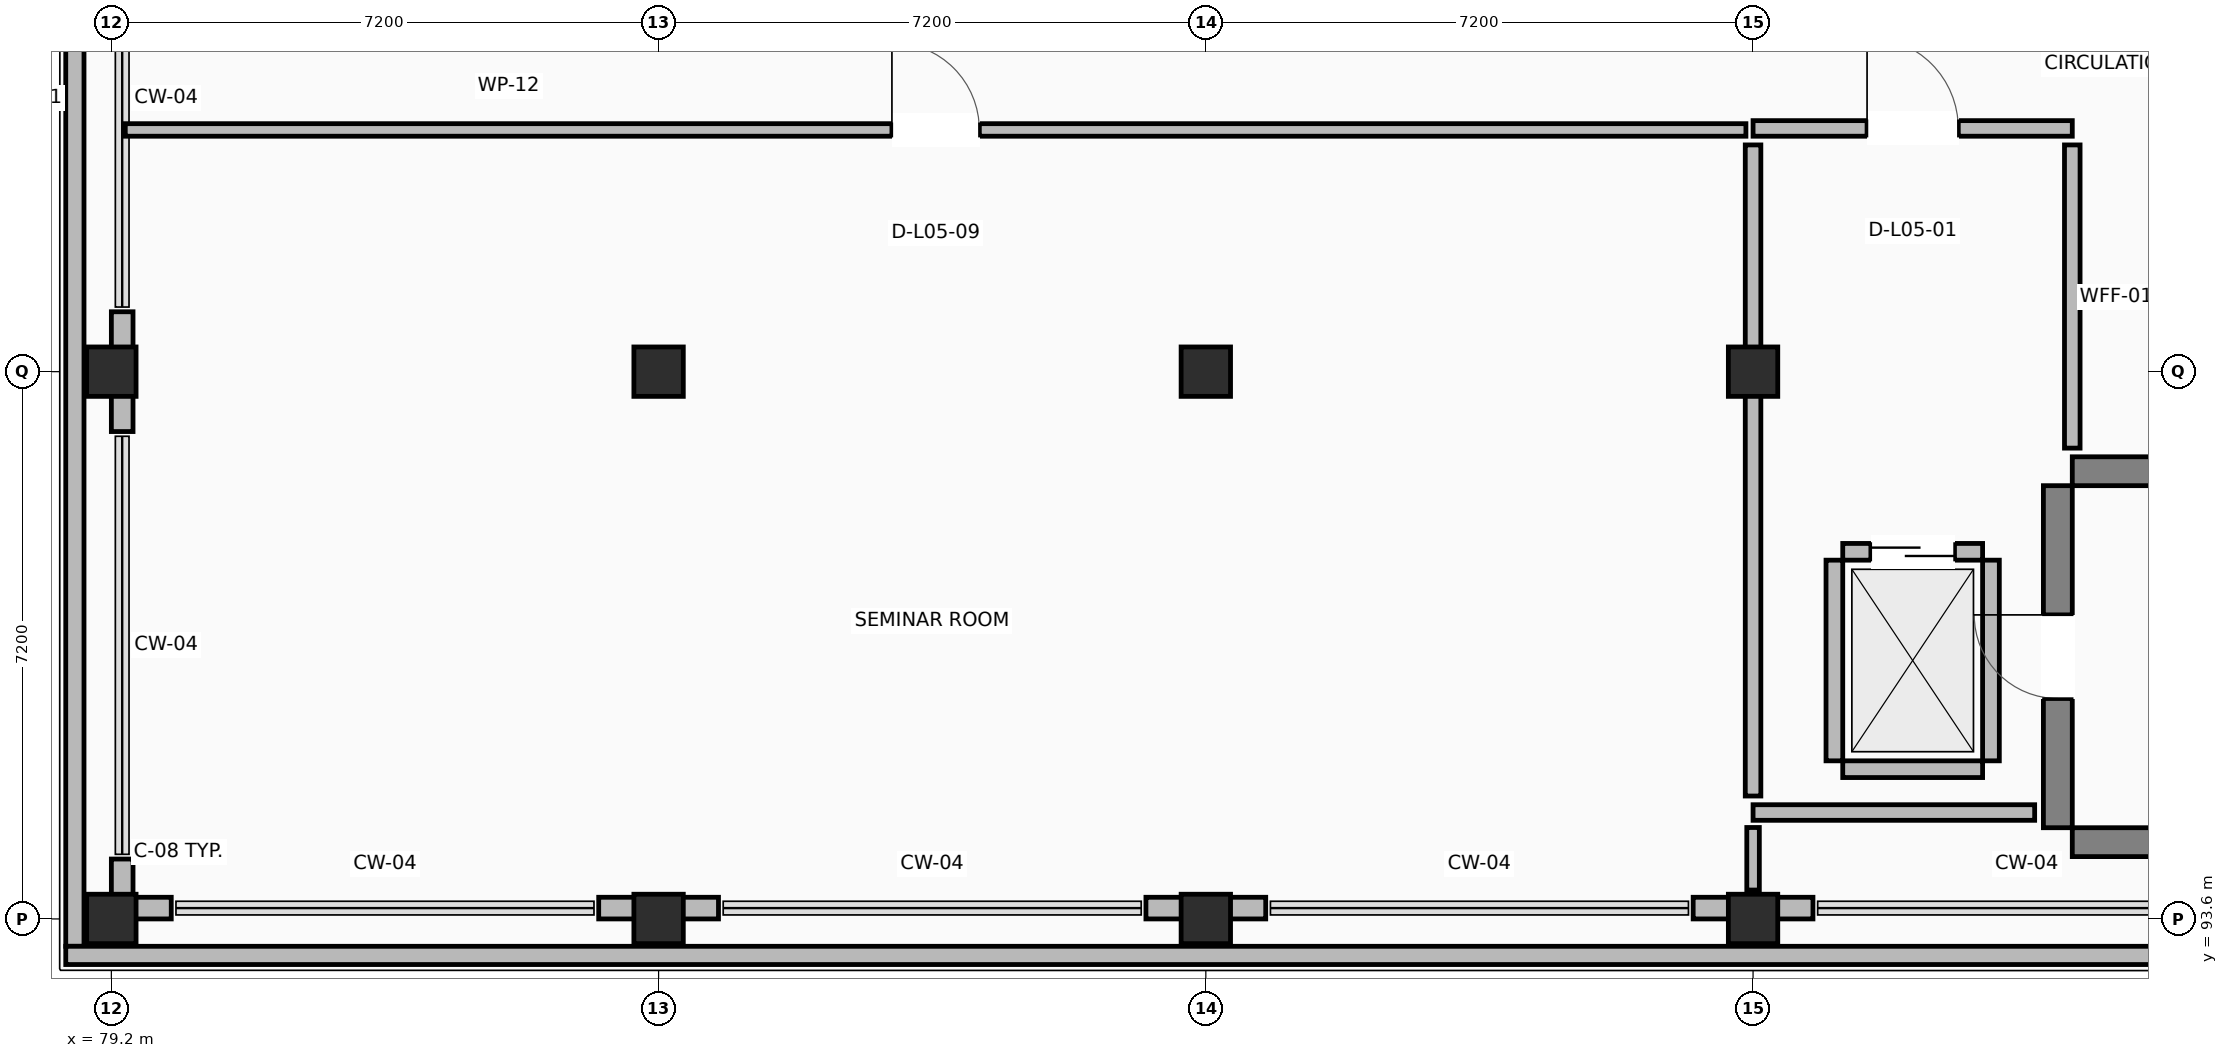
"""IFC4 building model, lengths in metres.
Left out: names, types, materials, properties, quantities, classifications, styles, units other than length and angle.
Written with IfcOpenShell. Run it as: python <this file> out.ifc"""

import sys

from ifc_helpers import new_model, si_unit, direction, frame, frame_2d, origin, origin_2d, place, context, subcontext, project, spatial, rectangle, extrude, element, fill, save


model = new_model("IFC4")
c1 = context("Model", 3, precision=1e-05, world=origin(), true_north=direction((0.0, 1.0)))
c2 = subcontext(c1, "Body", "Model", "MODEL_VIEW")
j1 = project(units=[si_unit("LENGTHUNIT", "METRE"), si_unit("PLANEANGLEUNIT", "RADIAN")], contexts=[c1])
p1 = place(None, origin())
s1 = spatial("IfcSite", under=j1, at=p1, CompositionType="ELEMENT")
p2 = place(p1, origin())
s2 = spatial("IfcBuilding", under=s1, at=p2, CompositionType="ELEMENT")
p3 = place(p2, frame((0.0, 0.0, 22.5)))
s3 = spatial("IfcBuildingStorey", under=s2, at=p3, CompositionType="ELEMENT", Elevation=22.5)
for number, where, z_axis, x_axis in (
    (1, (79.2, 93.6, 0.0), (0.0, 0.0, 1.0), (1.0, 0.0, 0.0)),
    (2, (79.2, 100.8, 0.0), (0.0, 0.0, 1.0), (1.0, 0.0, 0.0)),
    (3, (86.4, 93.6, 0.0), (0.0, 0.0, 1.0), (1.0, 0.0, 0.0)),
    (4, (86.4, 100.8, 0.0), (0.0, 0.0, 1.0), (1.0, 0.0, 0.0)),
    (5, (93.6, 93.6, 0.0), (0.0, 0.0, 1.0), (1.0, 0.0, 0.0)),
    (6, (93.6, 100.8, 0.0), (0.0, 0.0, 1.0), (1.0, 0.0, 0.0)),
    (7, (100.8, 93.6, 0.0), (0.0, 0.0, 1.0), (1.0, 0.0, 0.0)),
    (8, (100.8, 100.8, 0.0), (0.0, 0.0, 1.0), (1.0, 0.0, 0.0)),
):
    element("IfcColumn", number, at=place(p3, frame(where, z_axis=z_axis, x_axis=x_axis)), inside=s3, PredefinedType="COLUMN", context=c2, shape_type="SweptSolid", body=[
        extrude(rectangle(XDim=0.65, YDim=0.65, at=origin_2d()), origin(), (0.0, 0.0, 1.0), 4.22),
    ])
for number, where, z_axis, x_axis in (
    (9, (105.0, 94.61, 0.0), (0.0, 0.0, 1.0), (1.0, 0.0, 0.0)),
    (10, (105.0, 99.49, 0.0), (0.0, 0.0, 1.0), (1.0, 0.0, 0.0)),
):
    element("IfcWall", number, at=place(p3, frame(where, z_axis=z_axis, x_axis=x_axis)), inside=s3, PredefinedType="SHEAR", context=c2, shape_type="SweptSolid", body=[
        extrude(rectangle(XDim=9.5, YDim=0.38, at=frame_2d((4.75, 0.0))), origin(), (0.0, 0.0, 1.0), 4.22),
    ])
p4 = place(p3, frame((104.81, 94.8, 0.0), z_axis=(0.0, 0.0, 1.0), x_axis=(0.0, 1.0, 0.0)))
e11 = element("IfcWall", 11, at=p4, inside=s3, PredefinedType="SHEAR", context=c2, shape_type="SweptSolid", body=[
    extrude(rectangle(XDim=4.5, YDim=0.38, at=frame_2d((2.25, 0.0))), origin(), (0.0, 0.0, 1.0), 4.22),
])
p5 = place(p4, frame((1.7, 0.0, 0.0)))
e12 = element("IfcOpeningElement", 12, at=p5, cuts=e11, PredefinedType="OPENING", context=c2, shape_type="SweptSolid", body=[
    extrude(rectangle(XDim=1.1, YDim=2.15, at=frame_2d((0.55, 1.075))), frame((0.0, 0.2, 0.0), z_axis=(0.0, -1.0, 0.0), x_axis=(1.0, 0.0, 0.0)), (0.0, 0.0, 1.0), 0.4),
])
p6 = place(p3, frame((79.343, 101.588, 0.0), z_axis=(0.0, 0.0, 1.0), x_axis=(0.0, -1.0, 0.0)))
e13 = element("IfcWall", 13, at=p6, inside=s3, PredefinedType="STANDARD", context=c2, shape_type="SweptSolid", body=[
    extrude(rectangle(XDim=1.576, YDim=0.285, at=frame_2d((0.788, 0.0))), origin(), (0.0, 0.0, 1.0), 3.26),
])
p7 = place(p3, frame((79.343, 94.388, 0.0), z_axis=(0.0, 0.0, 1.0), x_axis=(0.0, -1.0, 0.0)))
e14 = element("IfcWall", 14, at=p7, inside=s3, PredefinedType="STANDARD", context=c2, shape_type="SweptSolid", body=[
    extrude(rectangle(XDim=0.503, YDim=0.285, at=frame_2d((0.251, 0.0))), origin(), (0.0, 0.0, 1.0), 3.26),
])
p8 = place(p3, frame((79.2, 93.742, 0.0), z_axis=(0.0, 0.0, 1.0), x_axis=(1.0, 0.0, 0.0)))
e15 = element("IfcWall", 15, at=p8, inside=s3, PredefinedType="STANDARD", context=c2, shape_type="SweptSolid", body=[
    extrude(rectangle(XDim=0.788, YDim=0.285, at=frame_2d((0.394, 0.0))), origin(), (0.0, 0.0, 1.0), 3.26),
])
for number, where, z_axis, x_axis in (
    (16, (85.612, 93.742, 0.0), (0.0, 0.0, 1.0), (1.0, 0.0, 0.0)),
    (17, (92.812, 93.742, 0.0), (0.0, 0.0, 1.0), (1.0, 0.0, 0.0)),
    (18, (100.012, 93.742, 0.0), (0.0, 0.0, 1.0), (1.0, 0.0, 0.0)),
):
    element("IfcWall", number, at=place(p3, frame(where, z_axis=z_axis, x_axis=x_axis)), inside=s3, PredefinedType="STANDARD", context=c2, shape_type="SweptSolid", body=[
        extrude(rectangle(XDim=1.576, YDim=0.285, at=frame_2d((0.788, 0.0))), origin(), (0.0, 0.0, 1.0), 3.26),
    ])
p9 = place(p3, frame((78.72, 93.24, 0.0), z_axis=(0.0, 0.0, 1.0), x_axis=(0.0, 1.0, 0.0)))
e19 = element("IfcWall", 19, at=p9, inside=s3, PredefinedType="PARAPET", context=c2, shape_type="SweptSolid", body=[
    extrude(rectangle(XDim=22.32, YDim=0.24, at=frame_2d((11.16, 0.0))), origin(), (0.0, 0.0, 1.0), 1.12),
])
p10 = place(p3, frame((136.44, 93.12, 0.0), z_axis=(0.0, 0.0, 1.0), x_axis=(-1.0, 0.0, 0.0)))
e20 = element("IfcWall", 20, at=p10, inside=s3, PredefinedType="PARAPET", context=c2, shape_type="SweptSolid", body=[
    extrude(rectangle(XDim=57.84, YDim=0.24, at=frame_2d((28.92, 0.0))), origin(), (0.0, 0.0, 1.0), 1.12),
])
p11 = place(p3, frame((101.98, 95.57, 0.0), z_axis=(0.0, 0.0, 1.0), x_axis=(1.0, 0.0, 0.0)))
e21 = element("IfcWall", 21, at=p11, inside=s3, PredefinedType="STANDARD", context=c2, shape_type="SweptSolid", body=[
    extrude(rectangle(XDim=1.84, YDim=0.22, at=frame_2d((0.92, 0.0))), origin(), (0.0, 0.0, 1.0), 3.26),
])
p12 = place(p3, frame((101.98, 98.43, 0.0), z_axis=(0.0, 0.0, 1.0), x_axis=(1.0, 0.0, 0.0)))
e22 = element("IfcWall", 22, at=p12, inside=s3, PredefinedType="STANDARD", context=c2, shape_type="SweptSolid", body=[
    extrude(rectangle(XDim=1.84, YDim=0.22, at=frame_2d((0.92, 0.0))), origin(), (0.0, 0.0, 1.0), 3.26),
])
p13 = place(p12, frame((0.37, 0.0, 0.0)))
e23 = element("IfcOpeningElement", 23, at=p13, cuts=e22, PredefinedType="OPENING", context=c2, shape_type="SweptSolid", body=[
    extrude(rectangle(XDim=1.1, YDim=2.15, at=frame_2d((0.55, 1.075))), frame((0.0, 0.12, 0.0), z_axis=(0.0, -1.0, 0.0), x_axis=(1.0, 0.0, 0.0)), (0.0, 0.0, 1.0), 0.24),
])
for number, where, z_axis, x_axis in (
    (24, (101.87, 95.68, 0.0), (0.0, 0.0, 1.0), (0.0, 1.0, 0.0)),
    (25, (103.93, 95.68, 0.0), (0.0, 0.0, 1.0), (0.0, 1.0, 0.0)),
):
    element("IfcWall", number, at=place(p3, frame(where, z_axis=z_axis, x_axis=x_axis)), inside=s3, PredefinedType="STANDARD", context=c2, shape_type="SweptSolid", body=[
        extrude(rectangle(XDim=2.64, YDim=0.22, at=frame_2d((1.32, 0.0))), origin(), (0.0, 0.0, 1.0), 3.26),
    ])
p14 = place(p3, frame((100.8, 104.0, 0.0), z_axis=(0.0, 0.0, 1.0), x_axis=(1.0, 0.0, 0.0)))
e26 = element("IfcWall", 26, at=p14, inside=s3, PredefinedType="PARTITIONING", context=c2, shape_type="SweptSolid", body=[
    extrude(rectangle(XDim=4.2, YDim=0.205, at=frame_2d((2.1, 0.0))), origin(), (0.0, 0.0, 1.0), 3.26),
])
p15 = place(p14, frame((1.5, 0.0, 0.0)))
e27 = element("IfcOpeningElement", 27, at=p15, cuts=e26, PredefinedType="OPENING", context=c2, shape_type="SweptSolid", body=[
    extrude(rectangle(XDim=1.2, YDim=2.15, at=frame_2d((0.6, 1.075))), frame((0.0, 0.113, 0.0), z_axis=(0.0, -1.0, 0.0), x_axis=(1.0, 0.0, 0.0)), (0.0, 0.0, 1.0), 0.225),
])
p16 = place(p3, frame((105.0, 103.783, 0.0), z_axis=(0.0, 0.0, 1.0), x_axis=(0.0, -1.0, 0.0)))
e28 = element("IfcWall", 28, at=p16, inside=s3, PredefinedType="PARTITIONING", context=c2, shape_type="SweptSolid", body=[
    extrude(rectangle(XDim=3.989, YDim=0.205, at=frame_2d((1.995, 0.0))), origin(), (0.0, 0.0, 1.0), 3.26),
])
p17 = place(p3, frame((104.505, 95.0, 0.0), z_axis=(0.0, 0.0, 1.0), x_axis=(-1.0, 0.0, 0.0)))
e29 = element("IfcWall", 29, at=p17, inside=s3, PredefinedType="PARTITIONING", context=c2, shape_type="SweptSolid", body=[
    extrude(rectangle(XDim=3.705, YDim=0.205, at=frame_2d((1.853, 0.0))), origin(), (0.0, 0.0, 1.0), 3.26),
])
p18 = place(p3, frame((100.8, 95.217, 0.0), z_axis=(0.0, 0.0, 1.0), x_axis=(0.0, 1.0, 0.0)))
e30 = element("IfcWall", 30, at=p18, inside=s3, PredefinedType="PARTITIONING", context=c2, shape_type="SweptSolid", body=[
    extrude(rectangle(XDim=8.566, YDim=0.205, at=frame_2d((4.283, 0.0))), origin(), (0.0, 0.0, 1.0), 3.26),
])
p19 = place(p3, frame((79.383, 103.98, 0.0), z_axis=(0.0, 0.0, 1.0), x_axis=(1.0, 0.0, 0.0)))
e31 = element("IfcWall", 31, at=p19, inside=s3, PredefinedType="PARTITIONING", context=c2, shape_type="SweptSolid", body=[
    extrude(rectangle(XDim=21.323, YDim=0.165, at=frame_2d((10.662, 0.0))), origin(), (0.0, 0.0, 1.0), 3.26),
])
p20 = place(p19, frame((10.087, 0.0, 0.0)))
e32 = element("IfcOpeningElement", 32, at=p20, cuts=e31, PredefinedType="OPENING", context=c2, shape_type="SweptSolid", body=[
    extrude(rectangle(XDim=1.15, YDim=2.15, at=frame_2d((0.575, 1.075))), frame((0.0, 0.093, 0.0), z_axis=(0.0, -1.0, 0.0), x_axis=(1.0, 0.0, 0.0)), (0.0, 0.0, 1.0), 0.185),
])
p21 = place(p3, frame((100.8, 94.803, 0.0), z_axis=(0.0, 0.0, 1.0), x_axis=(0.0, -1.0, 0.0)))
e33 = element("IfcWall", 33, at=p21, inside=s3, PredefinedType="PARTITIONING", context=c2, shape_type="SweptSolid", body=[
    extrude(rectangle(XDim=0.823, YDim=0.165, at=frame_2d((0.412, 0.0))), origin(), (0.0, 0.0, 1.0), 3.26),
])
p22 = place(p5, origin())
e34 = element("IfcDoor", 34, at=p22, inside=s3, OperationType="SINGLE_SWING_RIGHT", PredefinedType="DOOR", context=c2, shape_type="SweptSolid", body=[
    extrude(rectangle(XDim=1.1, YDim=2.15, at=frame_2d((0.55, 1.075))), frame((0.0, 0.025, 0.0), z_axis=(0.0, -1.0, 0.0), x_axis=(1.0, 0.0, 0.0)), (0.0, 0.0, 1.0), 0.05),
])
fill(e12, e34)
p23 = place(p13, origin())
e35 = element("IfcDoor", 35, at=p23, inside=s3, OperationType="SLIDING_TO_RIGHT", PredefinedType="DOOR", context=c2, shape_type="SweptSolid", body=[
    extrude(rectangle(XDim=1.1, YDim=2.15, at=frame_2d((0.55, 1.075))), frame((0.0, 0.025, 0.0), z_axis=(0.0, -1.0, 0.0), x_axis=(1.0, 0.0, 0.0)), (0.0, 0.0, 1.0), 0.05),
])
fill(e23, e35)
p24 = place(p15, origin())
e36 = element("IfcDoor", 36, at=p24, inside=s3, OperationType="SINGLE_SWING_LEFT", PredefinedType="DOOR", context=c2, shape_type="SweptSolid", body=[
    extrude(rectangle(XDim=1.2, YDim=2.15, at=frame_2d((0.6, 1.075))), frame((0.0, 0.025, 0.0), z_axis=(0.0, -1.0, 0.0), x_axis=(1.0, 0.0, 0.0)), (0.0, 0.0, 1.0), 0.05),
])
fill(e27, e36)
p25 = place(p20, origin())
e37 = element("IfcDoor", 37, at=p25, inside=s3, OperationType="SINGLE_SWING_LEFT", PredefinedType="DOOR", context=c2, shape_type="SweptSolid", body=[
    extrude(rectangle(XDim=1.15, YDim=2.15, at=frame_2d((0.575, 1.075))), frame((0.0, 0.025, 0.0), z_axis=(0.0, -1.0, 0.0), x_axis=(1.0, 0.0, 0.0)), (0.0, 0.0, 1.0), 0.05),
])
fill(e32, e37)
save(model, sys.argv[1])
